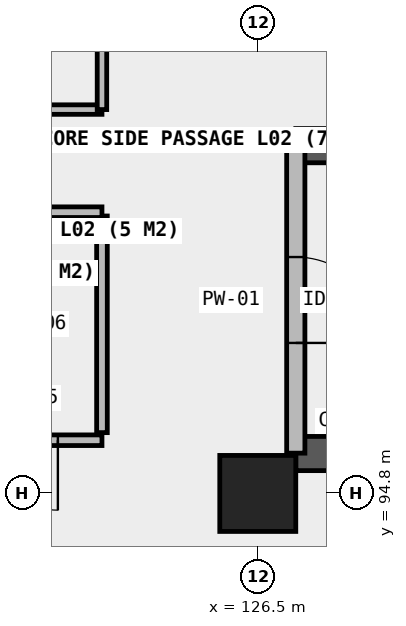
"""IFC4 building model, lengths in metres.
Left out: names, types, materials, properties, quantities, classifications, styles, units other than length and angle.
Written with IfcOpenShell. Run it as: python <this file> out.ifc"""

import sys

from ifc_helpers import new_model, si_unit, direction, frame, frame_2d, origin, origin_2d, place, context, subcontext, project, spatial, rectangle, extrude, element, fill, save


model = new_model("IFC4")
c1 = context("Model", 3, precision=1e-05, world=origin(), true_north=direction((0.0, 1.0)))
c2 = subcontext(c1, "Body", "Model", "MODEL_VIEW")
j1 = project(units=[si_unit("LENGTHUNIT", "METRE"), si_unit("PLANEANGLEUNIT", "RADIAN")], contexts=[c1])
p1 = place(None, origin())
s1 = spatial("IfcSite", under=j1, at=p1, CompositionType="ELEMENT")
p2 = place(p1, origin())
s2 = spatial("IfcBuilding", under=s1, at=p2, CompositionType="ELEMENT")
p3 = place(p2, frame((0.0, 0.0, 8.4)))
s3 = spatial("IfcBuildingStorey", under=s2, at=p3, CompositionType="ELEMENT", Elevation=8.4)
p4 = place(p3, frame((126.5, 94.8, 0.0), z_axis=(0.0, 0.0, 1.0), x_axis=(1.0, 0.0, 0.0)))
e1 = element("IfcColumn", 1, at=p4, inside=s3, PredefinedType="COLUMN", context=c2, shape_type="SweptSolid", body=[
    extrude(rectangle(XDim=1.0, YDim=1.0, at=origin_2d()), origin(), (0.0, 0.0, 1.0), 5.4),
])
p5 = place(p3, frame((127.0, 95.325, 0.0), z_axis=(0.0, 0.0, 1.0), x_axis=(1.0, 0.0, 0.0)))
e2 = element("IfcWall", 2, at=p5, inside=s3, PredefinedType="SHEAR", context=c2, shape_type="SweptSolid", body=[
    extrude(rectangle(XDim=9.15, YDim=0.45, at=frame_2d((4.575, 0.0))), origin(), (0.0, 0.0, 1.0), 5.4),
])
p6 = place(p3, frame((127.0, 99.375, 0.0), z_axis=(0.0, 0.0, 1.0), x_axis=(1.0, 0.0, 0.0)))
e3 = element("IfcWall", 3, at=p6, inside=s3, PredefinedType="SHEAR", context=c2, shape_type="SweptSolid", body=[
    extrude(rectangle(XDim=9.15, YDim=0.45, at=frame_2d((4.575, 0.0))), origin(), (0.0, 0.0, 1.0), 5.4),
])
p7 = place(p6, frame((0.55, 0.0, 0.0)))
e4 = element("IfcOpeningElement", 4, at=p7, cuts=e3, PredefinedType="OPENING", context=c2, shape_type="SweptSolid", body=[
    extrude(rectangle(XDim=1.13, YDim=2.15, at=frame_2d((0.565, 1.075))), frame((0.0, 0.235, 0.0), z_axis=(0.0, -1.0, 0.0), x_axis=(1.0, 0.0, 0.0)), (0.0, 0.0, 1.0), 0.47),
])
p8 = place(p3, frame((127.0, 95.33, 0.0), z_axis=(0.0, 0.0, 1.0), x_axis=(0.0, 1.0, 0.0)))
e5 = element("IfcWall", 5, at=p8, inside=s3, PredefinedType="SOLIDWALL", context=c2, shape_type="SweptSolid", body=[
    extrude(rectangle(XDim=4.04, YDim=0.24, at=frame_2d((2.02, 0.0))), origin(), (0.0, 0.0, 1.0), 5.12),
])
p9 = place(p8, frame((1.45, 0.0, 0.0)))
e6 = element("IfcOpeningElement", 6, at=p9, cuts=e5, PredefinedType="OPENING", context=c2, shape_type="SweptSolid", body=[
    extrude(rectangle(XDim=1.13, YDim=2.15, at=frame_2d((0.565, 1.075))), frame((0.0, 0.13, 0.0), z_axis=(0.0, -1.0, 0.0), x_axis=(1.0, 0.0, 0.0)), (0.0, 0.0, 1.0), 0.26),
])
p10 = place(p3, frame((118.15, 95.5, 0.0), z_axis=(0.0, 0.0, 1.0), x_axis=(1.0, 0.0, 0.0)))
e7 = element("IfcWall", 7, at=p10, inside=s3, PredefinedType="PLUMBINGWALL", context=c2, shape_type="SweptSolid", body=[
    extrude(rectangle(XDim=6.3, YDim=0.14, at=frame_2d((3.15, 0.0))), origin(), (0.0, 0.0, 1.0), 5.12),
])
p11 = place(p10, frame((0.72, 0.0, 0.0)))
e8 = element("IfcOpeningElement", 8, at=p11, cuts=e7, PredefinedType="OPENING", context=c2, shape_type="SweptSolid", body=[
    extrude(rectangle(XDim=0.95, YDim=2.1, at=frame_2d((0.475, 1.05))), frame((0.0, 0.08, 0.0), z_axis=(0.0, -1.0, 0.0), x_axis=(1.0, 0.0, 0.0)), (0.0, 0.0, 1.0), 0.16),
])
p12 = place(p10, frame((2.8, 0.0, 0.0)))
e9 = element("IfcOpeningElement", 9, at=p12, cuts=e7, PredefinedType="OPENING", context=c2, shape_type="SweptSolid", body=[
    extrude(rectangle(XDim=0.92, YDim=2.1, at=frame_2d((0.46, 1.05))), frame((0.0, 0.08, 0.0), z_axis=(0.0, -1.0, 0.0), x_axis=(1.0, 0.0, 0.0)), (0.0, 0.0, 1.0), 0.16),
])
p13 = place(p10, frame((4.8, 0.0, 0.0)))
e10 = element("IfcOpeningElement", 10, at=p13, cuts=e7, PredefinedType="OPENING", context=c2, shape_type="SweptSolid", body=[
    extrude(rectangle(XDim=0.92, YDim=2.1, at=frame_2d((0.46, 1.05))), frame((0.0, 0.08, 0.0), z_axis=(0.0, -1.0, 0.0), x_axis=(1.0, 0.0, 0.0)), (0.0, 0.0, 1.0), 0.16),
])
p14 = place(p3, frame((124.45, 95.6, 0.0), z_axis=(0.0, 0.0, 1.0), x_axis=(0.0, 1.0, 0.0)))
e11 = element("IfcWall", 11, at=p14, inside=s3, PredefinedType="PLUMBINGWALL", context=c2, shape_type="SweptSolid", body=[
    extrude(rectangle(XDim=2.85, YDim=0.14, at=frame_2d((1.425, 0.0))), origin(), (0.0, 0.0, 1.0), 5.12),
])
p15 = place(p3, frame((118.15, 98.5, 0.0), z_axis=(0.0, 0.0, 1.0), x_axis=(1.0, 0.0, 0.0)))
e12 = element("IfcWall", 12, at=p15, inside=s3, PredefinedType="PLUMBINGWALL", context=c2, shape_type="SweptSolid", body=[
    extrude(rectangle(XDim=6.3, YDim=0.14, at=frame_2d((3.15, 0.0))), origin(), (0.0, 0.0, 1.0), 5.12),
])
p16 = place(p3, frame((115.16, 99.85, 0.0), z_axis=(0.0, 0.0, 1.0), x_axis=(1.0, 0.0, 0.0)))
e13 = element("IfcWall", 13, at=p16, inside=s3, PredefinedType="MOVABLE", context=c2, shape_type="SweptSolid", body=[
    extrude(rectangle(XDim=9.29, YDim=0.125, at=frame_2d((4.645, 0.0))), origin(), (0.0, 0.0, 1.0), 5.12),
])
p17 = place(p16, frame((3.64, 0.0, 0.0)))
e14 = element("IfcOpeningElement", 14, at=p17, cuts=e13, PredefinedType="OPENING", context=c2, shape_type="SweptSolid", body=[
    extrude(rectangle(XDim=1.3, YDim=2.2, at=frame_2d((0.65, 1.1))), frame((0.0, 0.073, 0.0), z_axis=(0.0, -1.0, 0.0), x_axis=(1.0, 0.0, 0.0)), (0.0, 0.0, 1.0), 0.145),
])
p18 = place(p3, frame((124.45, 99.85, 0.0), z_axis=(0.0, 0.0, 1.0), x_axis=(0.0, 1.0, 0.0)))
e15 = element("IfcWall", 15, at=p18, inside=s3, PredefinedType="MOVABLE", context=c2, shape_type="SweptSolid", body=[
    extrude(rectangle(XDim=14.55, YDim=0.125, at=frame_2d((7.275, 0.0))), origin(), (0.0, 0.0, 1.0), 5.12),
])
p19 = place(p9, frame((0.565, 0.0, 0.0), z_axis=(0.0, 0.0, 1.0), x_axis=(-1.0, 0.0, 0.0)))
e16 = element("IfcDoor", 16, at=p19, inside=s3, OperationType="SINGLE_SWING_LEFT", PredefinedType="DOOR", context=c2, shape_type="SweptSolid", body=[
    extrude(rectangle(XDim=1.13, YDim=2.15, at=frame_2d((0.0, 1.075))), frame((0.0, 0.025, 0.0), z_axis=(0.0, -1.0, 0.0), x_axis=(1.0, 0.0, 0.0)), (0.0, 0.0, 1.0), 0.05),
])
fill(e6, e16)
p20 = place(p13, origin())
e17 = element("IfcDoor", 17, at=p20, inside=s3, OperationType="SINGLE_SWING_RIGHT", PredefinedType="DOOR", context=c2, shape_type="SweptSolid", body=[
    extrude(rectangle(XDim=0.92, YDim=2.1, at=frame_2d((0.46, 1.05))), frame((0.0, 0.025, 0.0), z_axis=(0.0, -1.0, 0.0), x_axis=(1.0, 0.0, 0.0)), (0.0, 0.0, 1.0), 0.05),
])
fill(e10, e17)
save(model, sys.argv[1])
